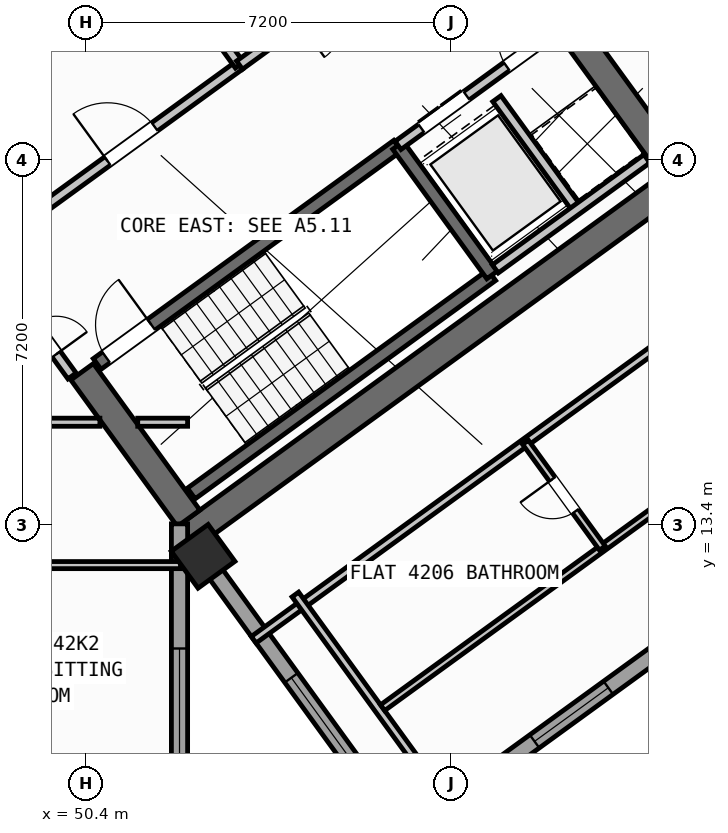
"""IFC4 building model, lengths in metres.
Left out: names, types, materials, properties, quantities, classifications, styles, units other than length and angle.
Written with IfcOpenShell. Run it as: python <this file> out.ifc"""

import sys

from ifc_helpers import new_model, si_unit, direction, frame, frame_2d, origin, origin_2d, place, context, subcontext, project, spatial, rectangle, hollow_rectangle, extrude, source, transform, mapped, element, fill, save


model = new_model("IFC4")
c1 = context("Model", 3, precision=1e-05, world=origin(), true_north=direction((0.0, 1.0)))
c2 = subcontext(c1, "Body", "Model", "MODEL_VIEW")
j1 = project(units=[si_unit("LENGTHUNIT", "METRE"), si_unit("PLANEANGLEUNIT", "RADIAN")], contexts=[c1])
p1 = place(None, origin())
s1 = spatial("IfcSite", under=j1, at=p1, CompositionType="ELEMENT")
p2 = place(p1, origin())
s2 = spatial("IfcBuilding", under=s1, at=p2, CompositionType="ELEMENT")
p3 = place(p2, frame((0.0, 0.0, 165.9)))
s3 = spatial("IfcBuildingStorey", under=s2, at=p3, CompositionType="ELEMENT", Elevation=165.9)
p4 = place(p3, frame((52.359, 13.14, 0.0), z_axis=(0.0, 0.0, 1.0), x_axis=(0.809014896919, 0.587788139183, 0.0)))
e1 = element("IfcWall", 1, at=p4, inside=s3, PredefinedType="SHEAR", context=c2, shape_type="SweptSolid", body=[
    extrude(rectangle(XDim=12.34, YDim=0.55, at=frame_2d((6.17, 0.0))), origin(), (0.0, 0.0, 1.0), 3.32),
])
for number, where, z_axis, x_axis in (
    (2, (52.42, 13.524, 0.0), (0.0, 0.0, 1.0), (-0.588, 0.809, 0.0)),
    (3, (61.958, 20.454, 0.0), (0.0, 0.0, 1.0), (-0.588, 0.809, 0.0)),
):
    element("IfcWall", number, at=place(p3, frame(where, z_axis=z_axis, x_axis=x_axis)), inside=s3, PredefinedType="SHEAR", context=c2, shape_type="SweptSolid", body=[
        extrude(rectangle(XDim=3.575, YDim=0.55, at=frame_2d((1.788, 0.0))), origin(), (0.0, 0.0, 1.0), 3.32),
    ])
m1 = source(origin(), c2, "Body", "SweptSolid", [
    extrude(hollow_rectangle(XDim=0.9, YDim=0.9, WallThickness=0.036, at=origin_2d()), origin(), (0.0, 0.0, 1.0), 3.6),
])
p5 = place(p3, frame((52.705, 12.773, 0.0), z_axis=(0.0, 0.0, 1.0), x_axis=(0.809016994375, 0.587785252292, 0.0)))
e4 = element("IfcColumn", 4, at=p5, inside=s3, PredefinedType="COLUMN", context=c2, shape_type="MappedRepresentation", body=[
    mapped(m1, transform((0.0, 0.0, 0.0), scale=1.0)),
])
p6 = place(p3, frame((58.455, 35.484, 0.0), z_axis=(0.0, 0.0, 1.0), x_axis=(0.587783625747, -0.809018176127, 0.0)))
e5 = element("IfcWall", 5, at=p6, inside=s3, PredefinedType="STANDARD", context=c2, shape_type="SweptSolid", body=[
    extrude(rectangle(XDim=21.587, YDim=0.32, at=frame_2d((10.794, 0.0))), origin(), (0.0, 0.0, 1.0), 2.795),
])
p7 = place(p6, frame((1.475, 0.0, 0.8)))
e6 = element("IfcOpeningElement", 6, at=p7, cuts=e5, PredefinedType="OPENING", context=c2, shape_type="SweptSolid", body=[
    extrude(rectangle(XDim=2.1, YDim=1.55, at=frame_2d((1.05, 0.775))), frame((0.0, 0.17, 0.0), z_axis=(0.0, -1.0, 0.0), x_axis=(1.0, 0.0, 0.0)), (0.0, 0.0, 1.0), 0.34),
])
p8 = place(p6, frame((5.13, 0.0, 0.85)))
e7 = element("IfcOpeningElement", 7, at=p8, cuts=e5, PredefinedType="OPENING", context=c2, shape_type="SweptSolid", body=[
    extrude(rectangle(XDim=1.5, YDim=1.5, at=frame_2d((0.75, 0.75))), frame((0.0, 0.17, 0.0), z_axis=(0.0, -1.0, 0.0), x_axis=(1.0, 0.0, 0.0)), (0.0, 0.0, 1.0), 0.34),
])
p9 = place(p6, frame((8.929, 0.0, 0.85)))
e8 = element("IfcOpeningElement", 8, at=p9, cuts=e5, PredefinedType="OPENING", context=c2, shape_type="SweptSolid", body=[
    extrude(rectangle(XDim=1.5, YDim=1.5, at=frame_2d((0.75, 0.75))), frame((0.0, 0.17, 0.0), z_axis=(0.0, -1.0, 0.0), x_axis=(1.0, 0.0, 0.0)), (0.0, 0.0, 1.0), 0.34),
])
p10 = place(p6, frame((17.581, 0.0, 0.95)))
e9 = element("IfcOpeningElement", 9, at=p10, cuts=e5, PredefinedType="OPENING", context=c2, shape_type="SweptSolid", body=[
    extrude(rectangle(XDim=1.2, YDim=1.4, at=frame_2d((0.6, 0.7))), frame((0.0, 0.17, 0.0), z_axis=(0.0, -1.0, 0.0), x_axis=(1.0, 0.0, 0.0)), (0.0, 0.0, 1.0), 0.34),
])
p11 = place(p3, frame((71.098, 17.731, 0.0), z_axis=(0.0, 0.0, 1.0), x_axis=(-0.809021120468, -0.587779573171, 0.0)))
e10 = element("IfcWall", 10, at=p11, inside=s3, PredefinedType="STANDARD", context=c2, shape_type="SweptSolid", body=[
    extrude(rectangle(XDim=17.588, YDim=0.32, at=frame_2d((8.794, 0.0))), origin(), (0.0, 0.0, 1.0), 3.32),
])
p12 = place(p11, frame((1.624, 0.0, 0.0)))
e11 = element("IfcOpeningElement", 11, at=p12, cuts=e10, PredefinedType="OPENING", context=c2, shape_type="SweptSolid", body=[
    extrude(rectangle(XDim=1.05, YDim=2.15, at=frame_2d((0.525, 1.075))), frame((0.0, 0.17, 0.0), z_axis=(0.0, -1.0, 0.0), x_axis=(1.0, 0.0, 0.0)), (0.0, 0.0, 1.0), 0.34),
])
p13 = place(p11, frame((4.104, 0.0, 1.0)))
e12 = element("IfcOpeningElement", 12, at=p13, cuts=e10, PredefinedType="OPENING", context=c2, shape_type="SweptSolid", body=[
    extrude(rectangle(XDim=0.9, YDim=1.25, at=frame_2d((0.45, 0.625))), frame((0.0, 0.17, 0.0), z_axis=(0.0, -1.0, 0.0), x_axis=(1.0, 0.0, 0.0)), (0.0, 0.0, 1.0), 0.34),
])
p14 = place(p11, frame((7.879, 0.0, 0.85)))
e13 = element("IfcOpeningElement", 13, at=p14, cuts=e10, PredefinedType="OPENING", context=c2, shape_type="SweptSolid", body=[
    extrude(rectangle(XDim=1.8, YDim=1.5, at=frame_2d((0.9, 0.75))), frame((0.0, 0.17, 0.0), z_axis=(0.0, -1.0, 0.0), x_axis=(1.0, 0.0, 0.0)), (0.0, 0.0, 1.0), 0.34),
])
p15 = place(p11, frame((12.849, 0.0, 0.85)))
e14 = element("IfcOpeningElement", 14, at=p15, cuts=e10, PredefinedType="OPENING", context=c2, shape_type="SweptSolid", body=[
    extrude(rectangle(XDim=1.8, YDim=1.5, at=frame_2d((0.9, 0.75))), frame((0.0, 0.17, 0.0), z_axis=(0.0, -1.0, 0.0), x_axis=(1.0, 0.0, 0.0)), (0.0, 0.0, 1.0), 0.34),
])
p16 = place(p3, frame((56.581, 7.439, 0.0), z_axis=(0.0, 0.0, 1.0), x_axis=(-0.587771678454, 0.809026856172, 0.0)))
e15 = element("IfcWall", 15, at=p16, inside=s3, PredefinedType="STANDARD", context=c2, shape_type="SweptSolid", body=[
    extrude(rectangle(XDim=6.824, YDim=0.32, at=frame_2d((3.412, 0.0))), origin(), (0.0, 0.0, 1.0), 2.795),
])
p17 = place(p16, frame((1.531, 0.0, 0.8)))
e16 = element("IfcOpeningElement", 16, at=p17, cuts=e15, PredefinedType="OPENING", context=c2, shape_type="SweptSolid", body=[
    extrude(rectangle(XDim=2.1, YDim=1.55, at=frame_2d((1.05, 0.775))), frame((0.0, 0.17, 0.0), z_axis=(0.0, -1.0, 0.0), x_axis=(1.0, 0.0, 0.0)), (0.0, 0.0, 1.0), 0.34),
])
p18 = place(p3, frame((52.24, 13.414, 0.0), z_axis=(0.0, 0.0, 1.0), x_axis=(0.0, -1.0, 0.0)))
e17 = element("IfcWall", 17, at=p18, inside=s3, PredefinedType="STANDARD", context=c2, shape_type="SweptSolid", body=[
    extrude(rectangle(XDim=9.948, YDim=0.32, at=frame_2d((4.974, 0.0))), origin(), (0.0, 0.0, 1.0), 3.32),
])
p19 = place(p18, frame((2.46, 0.0, 0.8)))
e18 = element("IfcOpeningElement", 18, at=p19, cuts=e17, PredefinedType="OPENING", context=c2, shape_type="SweptSolid", body=[
    extrude(rectangle(XDim=2.1, YDim=1.55, at=frame_2d((1.05, 0.775))), frame((0.0, 0.17, 0.0), z_axis=(0.0, -1.0, 0.0), x_axis=(1.0, 0.0, 0.0)), (0.0, 0.0, 1.0), 0.34),
])
p20 = place(p18, frame((7.183, 0.0, 0.85)))
e19 = element("IfcOpeningElement", 19, at=p20, cuts=e17, PredefinedType="OPENING", context=c2, shape_type="SweptSolid", body=[
    extrude(rectangle(XDim=1.8, YDim=1.5, at=frame_2d((0.9, 0.75))), frame((0.0, 0.17, 0.0), z_axis=(0.0, -1.0, 0.0), x_axis=(1.0, 0.0, 0.0)), (0.0, 0.0, 1.0), 0.34),
])
p21 = place(p3, frame((52.472, 14.013, 0.0), z_axis=(0.0, 0.0, 1.0), x_axis=(0.809028366311, 0.587769599847, 0.0)))
e20 = element("IfcWall", 20, at=p21, inside=s3, PredefinedType="SHEAR", context=c2, shape_type="SweptSolid", body=[
    extrude(rectangle(XDim=7.33, YDim=0.26, at=frame_2d((3.665, 0.0))), origin(), (0.0, 0.0, 1.0), 3.32),
])
p22 = place(p3, frame((50.615, 16.57, 0.0), z_axis=(0.0, 0.0, 1.0), x_axis=(0.809028366311, 0.587769599847, 0.0)))
e21 = element("IfcWall", 21, at=p22, inside=s3, PredefinedType="SHEAR", context=c2, shape_type="SweptSolid", body=[
    extrude(rectangle(XDim=7.33, YDim=0.26, at=frame_2d((3.665, 0.0))), origin(), (0.0, 0.0, 1.0), 3.32),
])
p23 = place(p22, frame((0.22, 0.0, 0.0)))
e22 = element("IfcOpeningElement", 22, at=p23, cuts=e21, PredefinedType="OPENING", context=c2, shape_type="SweptSolid", body=[
    extrude(rectangle(XDim=1.1, YDim=2.1, at=frame_2d((0.55, 1.05))), frame((0.0, 0.14, 0.0), z_axis=(0.0, -1.0, 0.0), x_axis=(1.0, 0.0, 0.0)), (0.0, 0.0, 1.0), 0.28),
])
p24 = place(p3, frame((58.41, 18.327, 0.0), z_axis=(0.0, 0.0, 1.0), x_axis=(-0.58776738483, 0.809029975545, 0.0)))
e23 = element("IfcWall", 23, at=p24, inside=s3, PredefinedType="SHEAR", context=c2, shape_type="SweptSolid", body=[
    extrude(rectangle(XDim=3.16, YDim=0.26, at=frame_2d((1.58, 0.0))), origin(), (0.0, 0.0, 1.0), 3.32),
])
p25 = place(p3, frame((47.065, 21.407, 0.0), z_axis=(0.0, 0.0, 1.0), x_axis=(0.809032984992, 0.587763242466, 0.0)))
e24 = element("IfcWall", 24, at=p25, inside=s3, PredefinedType="STANDARD", context=c2, shape_type="SweptSolid", body=[
    extrude(rectangle(XDim=3.448, YDim=0.2, at=frame_2d((1.724, 0.0))), origin(), (0.0, 0.0, 1.0), 3.31),
])
p26 = place(p25, frame((0.458, 0.0, 0.0)))
e25 = element("IfcOpeningElement", 25, at=p26, cuts=e24, PredefinedType="OPENING", context=c2, shape_type="SweptSolid", body=[
    extrude(rectangle(XDim=1.3, YDim=2.2, at=frame_2d((0.65, 1.1))), frame((0.0, 0.11, 0.0), z_axis=(0.0, -1.0, 0.0), x_axis=(1.0, 0.0, 0.0)), (0.0, 0.0, 1.0), 0.22),
])
p27 = place(p3, frame((48.758, 19.077, 0.0), z_axis=(0.0, 0.0, 1.0), x_axis=(0.809005065155, 0.587801671104, 0.0)))
e26 = element("IfcWall", 26, at=p27, inside=s3, PredefinedType="STANDARD", context=c2, shape_type="SweptSolid", body=[
    extrude(rectangle(XDim=5.768, YDim=0.2, at=frame_2d((2.884, 0.0))), origin(), (0.0, 0.0, 1.0), 3.31),
])
p28 = place(p27, frame((2.548, 0.0, 0.0)))
e27 = element("IfcOpeningElement", 27, at=p28, cuts=e26, PredefinedType="OPENING", context=c2, shape_type="SweptSolid", body=[
    extrude(rectangle(XDim=1.15, YDim=2.1, at=frame_2d((0.575, 1.05))), frame((0.0, 0.11, 0.0), z_axis=(0.0, -1.0, 0.0), x_axis=(1.0, 0.0, 0.0)), (0.0, 0.0, 1.0), 0.22),
])
p29 = place(p3, frame((56.553, 20.884, 0.0), z_axis=(0.0, 0.0, 1.0), x_axis=(0.809023564264, 0.58777620951, 0.0)))
e28 = element("IfcWall", 28, at=p29, inside=s3, PredefinedType="STANDARD", context=c2, shape_type="SweptSolid", body=[
    extrude(rectangle(XDim=3.818, YDim=0.2, at=frame_2d((1.909, 0.0))), origin(), (0.0, 0.0, 1.0), 3.31),
])
p30 = place(p29, frame((0.57, 0.0, 0.0)))
e29 = element("IfcOpeningElement", 29, at=p30, cuts=e28, PredefinedType="OPENING", context=c2, shape_type="SweptSolid", body=[
    extrude(rectangle(XDim=1.1, YDim=2.15, at=frame_2d((0.55, 1.075))), frame((0.0, 0.11, 0.0), z_axis=(0.0, -1.0, 0.0), x_axis=(1.0, 0.0, 0.0)), (0.0, 0.0, 1.0), 0.22),
])
p31 = place(p29, frame((2.65, 0.0, 0.0)))
e30 = element("IfcOpeningElement", 30, at=p31, cuts=e28, PredefinedType="OPENING", context=c2, shape_type="SweptSolid", body=[
    extrude(rectangle(XDim=0.86, YDim=2.05, at=frame_2d((0.43, 1.025))), frame((0.0, 0.11, 0.0), z_axis=(0.0, -1.0, 0.0), x_axis=(1.0, 0.0, 0.0)), (0.0, 0.0, 1.0), 0.22),
])
p32 = place(p3, frame((60.067, 19.655, 0.0), z_axis=(0.0, 0.0, 1.0), x_axis=(-0.587800520745, 0.809005900975, 0.0)))
e31 = element("IfcWall", 31, at=p32, inside=s3, PredefinedType="STANDARD", context=c2, shape_type="SweptSolid", body=[
    extrude(rectangle(XDim=2.66, YDim=0.2, at=frame_2d((1.33, 0.0))), origin(), (0.0, 0.0, 1.0), 3.31),
])
p33 = place(p3, frame((58.472, 18.447, 0.0), z_axis=(0.0, 0.0, 1.0), x_axis=(0.809018631237, 0.587782999339, 0.0)))
e32 = element("IfcWall", 32, at=p33, inside=s3, PredefinedType="STANDARD", context=c2, shape_type="SweptSolid", body=[
    extrude(rectangle(XDim=3.698, YDim=0.2, at=frame_2d((1.849, 0.0))), origin(), (0.0, 0.0, 1.0), 3.31),
])
p34 = place(p3, frame((53.425, 22.468, 0.0), z_axis=(0.0, 0.0, 1.0), x_axis=(-0.5877230039, 0.809062216821, 0.0)))
e33 = element("IfcWall", 33, at=p34, inside=s3, PredefinedType="STANDARD", context=c2, shape_type="SweptSolid", body=[
    extrude(rectangle(XDim=2.88, YDim=0.2, at=frame_2d((1.44, 0.0))), origin(), (0.0, 0.0, 1.0), 3.31),
])
p35 = place(p3, frame((53.425, 22.468, 0.0), z_axis=(0.0, 0.0, 1.0), x_axis=(0.809024377198, 0.587775090574, 0.0)))
e34 = element("IfcWall", 34, at=p35, inside=s3, PredefinedType="STANDARD", context=c2, shape_type="SweptSolid", body=[
    extrude(rectangle(XDim=5.418, YDim=0.2, at=frame_2d((2.709, 0.0))), origin(), (0.0, 0.0, 1.0), 3.31),
])
p36 = place(p35, frame((4.28, 0.0, 0.0)))
e35 = element("IfcOpeningElement", 35, at=p36, cuts=e34, PredefinedType="OPENING", context=c2, shape_type="SweptSolid", body=[
    extrude(rectangle(XDim=0.86, YDim=2.05, at=frame_2d((0.43, 1.025))), frame((0.0, 0.11, 0.0), z_axis=(0.0, -1.0, 0.0), x_axis=(1.0, 0.0, 0.0)), (0.0, 0.0, 1.0), 0.22),
])
p37 = place(p35, frame((1.45, 0.0, 0.0)))
e36 = element("IfcOpeningElement", 36, at=p37, cuts=e34, PredefinedType="OPENING", context=c2, shape_type="SweptSolid", body=[
    extrude(rectangle(XDim=0.86, YDim=2.05, at=frame_2d((0.43, 1.025))), frame((0.0, 0.11, 0.0), z_axis=(0.0, -1.0, 0.0), x_axis=(1.0, 0.0, 0.0)), (0.0, 0.0, 1.0), 0.22),
])
p38 = place(p3, frame((35.237, 15.42, 0.0), z_axis=(0.0, 0.0, 1.0), x_axis=(1.0, 0.0, 0.0)))
e37 = element("IfcWall", 37, at=p38, inside=s3, PredefinedType="PARTITIONING", context=c2, shape_type="SweptSolid", body=[
    extrude(rectangle(XDim=15.432, YDim=0.16, at=frame_2d((7.716, 0.0))), origin(), (0.0, 0.0, 1.0), 3.31),
])
p39 = place(p38, frame((0.674, 0.0, 0.0)))
e38 = element("IfcOpeningElement", 38, at=p39, cuts=e37, PredefinedType="OPENING", context=c2, shape_type="SweptSolid", body=[
    extrude(rectangle(XDim=1.0, YDim=2.1, at=frame_2d((0.5, 1.05))), frame((0.0, 0.09, 0.0), z_axis=(0.0, -1.0, 0.0), x_axis=(1.0, 0.0, 0.0)), (0.0, 0.0, 1.0), 0.18),
])
p40 = place(p38, frame((9.094, 0.0, 0.0)))
e39 = element("IfcOpeningElement", 39, at=p40, cuts=e37, PredefinedType="OPENING", context=c2, shape_type="SweptSolid", body=[
    extrude(rectangle(XDim=1.0, YDim=2.1, at=frame_2d((0.5, 1.05))), frame((0.0, 0.09, 0.0), z_axis=(0.0, -1.0, 0.0), x_axis=(1.0, 0.0, 0.0)), (0.0, 0.0, 1.0), 0.18),
])
p41 = place(p3, frame((51.416, 15.42, 0.0), z_axis=(0.0, 0.0, 1.0), x_axis=(1.0, 0.0, 0.0)))
e40 = element("IfcWall", 40, at=p41, inside=s3, PredefinedType="PARTITIONING", context=c2, shape_type="SweptSolid", body=[
    extrude(rectangle(XDim=0.984, YDim=0.16, at=frame_2d((0.492, 0.0))), origin(), (0.0, 0.0, 1.0), 3.31),
])
p42 = place(p3, frame((50.119, 16.333, 0.0), z_axis=(0.0, 0.0, 1.0), x_axis=(-0.587749856981, 0.809042709391, 0.0)))
e41 = element("IfcWall", 41, at=p42, inside=s3, PredefinedType="STANDARD", context=c2, shape_type="SweptSolid", body=[
    extrude(rectangle(XDim=2.96, YDim=0.2, at=frame_2d((1.48, 0.0))), origin(), (0.0, 0.0, 1.0), 3.31),
])
p43 = place(p42, frame((0.53, 0.0, 0.0)))
e42 = element("IfcOpeningElement", 42, at=p43, cuts=e41, PredefinedType="OPENING", context=c2, shape_type="SweptSolid", body=[
    extrude(rectangle(XDim=1.5, YDim=2.15, at=frame_2d((0.75, 1.075))), frame((0.0, 0.11, 0.0), z_axis=(0.0, -1.0, 0.0), x_axis=(1.0, 0.0, 0.0)), (0.0, 0.0, 1.0), 0.22),
])
p44 = place(p3, frame((47.663, 12.6, 0.0), z_axis=(0.0, 0.0, 1.0), x_axis=(1.0, 0.0, 0.0)))
e43 = element("IfcWall", 43, at=p44, inside=s3, PredefinedType="PLUMBINGWALL", context=c2, shape_type="SweptSolid", body=[
    extrude(rectangle(XDim=4.597, YDim=0.14, at=frame_2d((2.298, 0.0))), origin(), (0.0, 0.0, 1.0), 2.495),
])
p45 = place(p3, frame((53.705, 11.126, 0.0), z_axis=(0.0, 0.0, 1.0), x_axis=(0.809014504436, 0.587788679384, 0.0)))
e44 = element("IfcWall", 44, at=p45, inside=s3, PredefinedType="PARTITIONING", context=c2, shape_type="SweptSolid", body=[
    extrude(rectangle(XDim=14.67, YDim=0.16, at=frame_2d((7.335, 0.0))), origin(), (0.0, 0.0, 1.0), 3.31),
])
p46 = place(p45, frame((10.2, 0.0, 0.0)))
e45 = element("IfcOpeningElement", 45, at=p46, cuts=e44, PredefinedType="OPENING", context=c2, shape_type="SweptSolid", body=[
    extrude(rectangle(XDim=1.0, YDim=2.1, at=frame_2d((0.5, 1.05))), frame((0.0, 0.09, 0.0), z_axis=(0.0, -1.0, 0.0), x_axis=(1.0, 0.0, 0.0)), (0.0, 0.0, 1.0), 0.18),
])
p47 = place(p3, frame((57.747, 7.586, 0.0), z_axis=(0.0, 0.0, 1.0), x_axis=(-0.587784893399, 0.809017255126, 0.0)))
e46 = element("IfcWall", 46, at=p47, inside=s3, PredefinedType="PARTITIONING", context=c2, shape_type="SweptSolid", body=[
    extrude(rectangle(XDim=5.48, YDim=0.16, at=frame_2d((2.74, 0.0))), origin(), (0.0, 0.0, 1.0), 3.31),
])
p48 = place(p3, frame((56.249, 9.785, 0.0), z_axis=(0.0, 0.0, 1.0), x_axis=(0.809011747655, 0.587792473715, 0.0)))
e47 = element("IfcWall", 47, at=p48, inside=s3, PredefinedType="PLUMBINGWALL", context=c2, shape_type="SweptSolid", body=[
    extrude(rectangle(XDim=13.4, YDim=0.14, at=frame_2d((6.7, 0.0))), origin(), (0.0, 0.0, 1.0), 3.31),
])
p49 = place(p48, frame((8.94, 0.0, 0.0)))
e48 = element("IfcOpeningElement", 48, at=p49, cuts=e47, PredefinedType="OPENING", context=c2, shape_type="SweptSolid", body=[
    extrude(rectangle(XDim=0.92, YDim=2.08, at=frame_2d((0.46, 1.04))), frame((0.0, 0.08, 0.0), z_axis=(0.0, -1.0, 0.0), x_axis=(1.0, 0.0, 0.0)), (0.0, 0.0, 1.0), 0.16),
])
p50 = place(p3, frame((60.585, 12.936, 0.0), z_axis=(0.0, 0.0, 1.0), x_axis=(-0.587772116736, 0.809026537752, 0.0)))
e49 = element("IfcWall", 49, at=p50, inside=s3, PredefinedType="PLUMBINGWALL", context=c2, shape_type="SweptSolid", body=[
    extrude(rectangle(XDim=2.58, YDim=0.14, at=frame_2d((1.29, 0.0))), origin(), (0.0, 0.0, 1.0), 3.31),
])
p51 = place(p50, frame((0.9, 0.0, 0.0)))
e50 = element("IfcOpeningElement", 50, at=p51, cuts=e49, PredefinedType="OPENING", context=c2, shape_type="SweptSolid", body=[
    extrude(rectangle(XDim=0.78, YDim=2.05, at=frame_2d((0.39, 1.025))), frame((0.0, 0.08, 0.0), z_axis=(0.0, -1.0, 0.0), x_axis=(1.0, 0.0, 0.0)), (0.0, 0.0, 1.0), 0.16),
])
m2 = source(origin(), c2, "Body", "SweptSolid", [
    extrude(rectangle(XDim=1.8, YDim=1.5, at=frame_2d((0.9, 0.75))), frame((0.0, 0.03, 0.0), z_axis=(0.0, -1.0, 0.0), x_axis=(1.0, 0.0, 0.0)), (0.0, 0.0, 1.0), 0.06),
])
p52 = place(p15, origin())
e51 = element("IfcWindow", 51, at=p52, inside=s3, PartitioningType="SINGLE_PANEL", PredefinedType="WINDOW", context=c2, shape_type="MappedRepresentation", body=[
    mapped(m2, transform((0.0, 0.0, 0.0), scale=1.0)),
])
fill(e14, e51)
m3 = source(origin(), c2, "Body", "SweptSolid", [
    extrude(rectangle(XDim=2.1, YDim=1.55, at=frame_2d((1.05, 0.775))), frame((0.0, 0.03, 0.0), z_axis=(0.0, -1.0, 0.0), x_axis=(1.0, 0.0, 0.0)), (0.0, 0.0, 1.0), 0.06),
])
p53 = place(p17, origin())
e52 = element("IfcWindow", 52, at=p53, inside=s3, PartitioningType="SINGLE_PANEL", PredefinedType="WINDOW", context=c2, shape_type="MappedRepresentation", body=[
    mapped(m3, transform((0.0, 0.0, 0.0), scale=1.0)),
])
fill(e16, e52)
p54 = place(p19, origin())
e53 = element("IfcWindow", 53, at=p54, inside=s3, PartitioningType="SINGLE_PANEL", PredefinedType="WINDOW", context=c2, shape_type="MappedRepresentation", body=[
    mapped(m3, transform((0.0, 0.0, 0.0), scale=1.0)),
])
fill(e18, e53)
m4 = source(origin(), c2, "Body", "SweptSolid", [
    extrude(rectangle(XDim=1.1, YDim=2.1, at=frame_2d((0.55, 1.05))), frame((0.0, 0.025, 0.0), z_axis=(0.0, -1.0, 0.0), x_axis=(1.0, 0.0, 0.0)), (0.0, 0.0, 1.0), 0.05),
])
p55 = place(p23, origin())
e54 = element("IfcDoor", 54, at=p55, inside=s3, OperationType="SINGLE_SWING_RIGHT", PredefinedType="DOOR", context=c2, shape_type="MappedRepresentation", body=[
    mapped(m4, transform((0.0, 0.0, 0.0), scale=1.0)),
])
fill(e22, e54)
m5 = source(origin(), c2, "Body", "SweptSolid", [
    extrude(rectangle(XDim=1.15, YDim=2.1, at=frame_2d((0.575, 1.05))), frame((0.0, 0.025, 0.0), z_axis=(0.0, -1.0, 0.0), x_axis=(1.0, 0.0, 0.0)), (0.0, 0.0, 1.0), 0.05),
])
p56 = place(p28, origin())
e55 = element("IfcDoor", 55, at=p56, inside=s3, OperationType="SINGLE_SWING_LEFT", PredefinedType="DOOR", context=c2, shape_type="MappedRepresentation", body=[
    mapped(m5, transform((0.0, 0.0, 0.0), scale=1.0)),
])
fill(e27, e55)
m6 = source(origin(), c2, "Body", "SweptSolid", [
    extrude(rectangle(XDim=1.1, YDim=2.15, at=frame_2d((0.55, 1.075))), frame((0.0, 0.025, 0.0), z_axis=(0.0, -1.0, 0.0), x_axis=(1.0, 0.0, 0.0)), (0.0, 0.0, 1.0), 0.05),
])
p57 = place(p30, origin())
e56 = element("IfcDoor", 56, at=p57, inside=s3, OperationType="DOUBLE_DOOR_SLIDING", PredefinedType="DOOR", context=c2, shape_type="MappedRepresentation", body=[
    mapped(m6, transform((0.0, 0.0, 0.0), scale=1.0)),
])
fill(e29, e56)
m7 = source(origin(), c2, "Body", "SweptSolid", [
    extrude(rectangle(XDim=0.86, YDim=2.05, at=frame_2d((0.43, 1.025))), frame((0.0, 0.025, 0.0), z_axis=(0.0, -1.0, 0.0), x_axis=(1.0, 0.0, 0.0)), (0.0, 0.0, 1.0), 0.05),
])
p58 = place(p31, origin())
e57 = element("IfcDoor", 57, at=p58, inside=s3, OperationType="SINGLE_SWING_RIGHT", PredefinedType="DOOR", context=c2, shape_type="MappedRepresentation", body=[
    mapped(m7, transform((0.0, 0.0, 0.0), scale=1.0)),
])
fill(e30, e57)
m8 = source(origin(), c2, "Body", "SweptSolid", [
    extrude(rectangle(XDim=1.5, YDim=2.15, at=frame_2d((0.75, 1.075))), frame((0.0, 0.025, 0.0), z_axis=(0.0, -1.0, 0.0), x_axis=(1.0, 0.0, 0.0)), (0.0, 0.0, 1.0), 0.05),
])
p59 = place(p43, frame((1.5, 0.0, 0.0), z_axis=(0.0, 0.0, 1.0), x_axis=(-1.0, 0.0, 0.0)))
e58 = element("IfcDoor", 58, at=p59, inside=s3, OperationType="DOUBLE_DOOR_SINGLE_SWING", PredefinedType="DOOR", context=c2, shape_type="MappedRepresentation", body=[
    mapped(m8, transform((0.0, 0.0, 0.0), scale=1.0)),
])
fill(e42, e58)
m9 = source(origin(), c2, "Body", "SweptSolid", [
    extrude(rectangle(XDim=0.78, YDim=2.05, at=frame_2d((0.39, 1.025))), frame((0.0, 0.025, 0.0), z_axis=(0.0, -1.0, 0.0), x_axis=(1.0, 0.0, 0.0)), (0.0, 0.0, 1.0), 0.05),
])
p60 = place(p51, origin())
e59 = element("IfcDoor", 59, at=p60, inside=s3, OperationType="SINGLE_SWING_RIGHT", PredefinedType="DOOR", context=c2, shape_type="MappedRepresentation", body=[
    mapped(m9, transform((0.0, 0.0, 0.0), scale=1.0)),
])
fill(e50, e59)
save(model, sys.argv[1])
